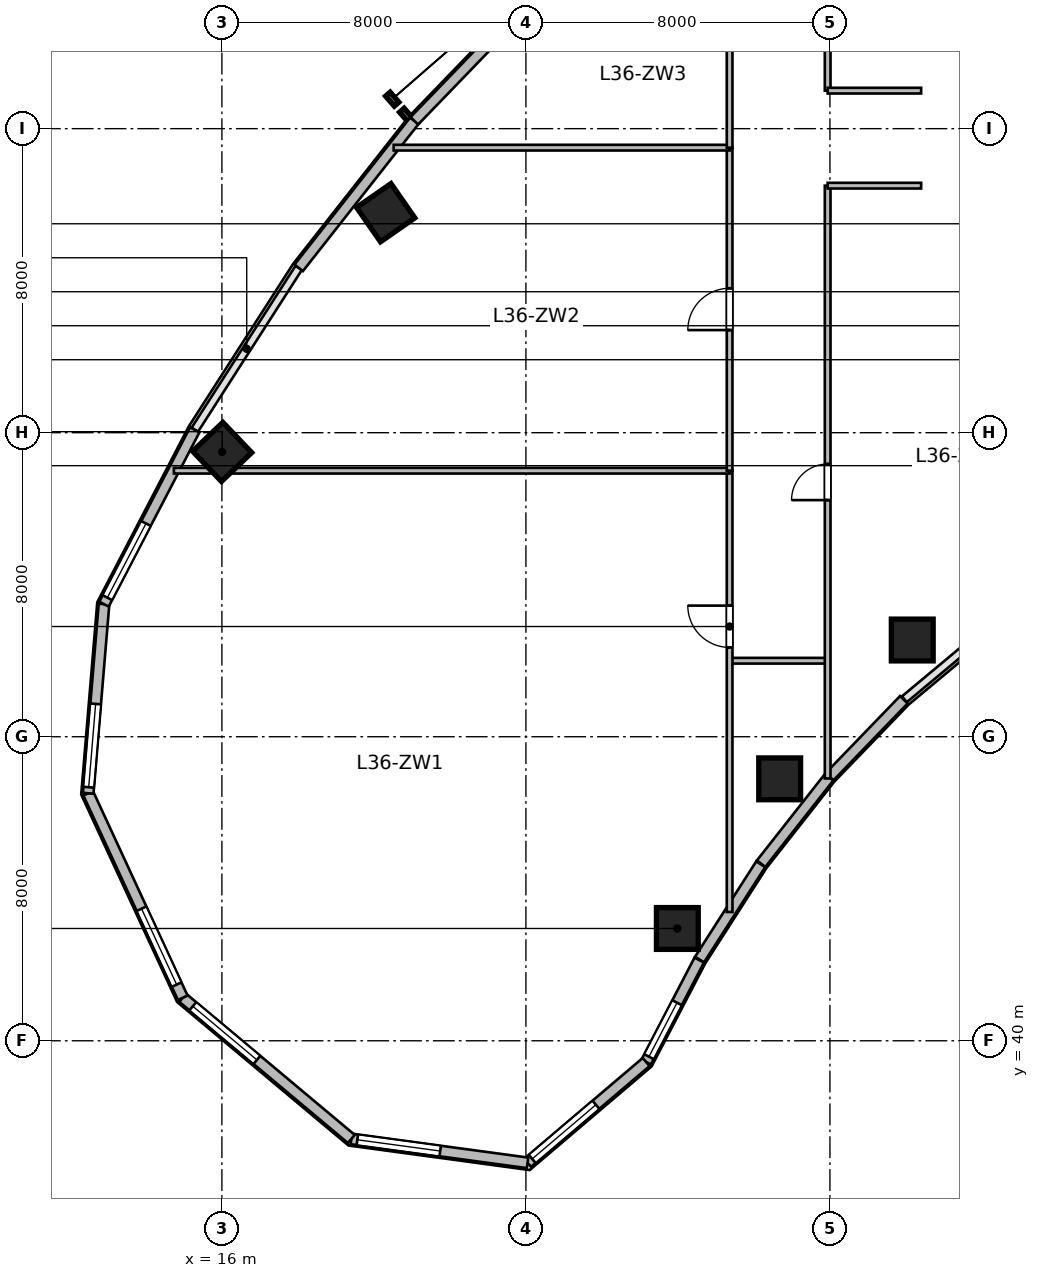
"""IFC4 building model, lengths in metres.
Left out: names, types, materials, properties, quantities, classifications, styles, units other than length and angle.
Written with IfcOpenShell. Run it as: python <this file> out.ifc"""

import sys

from ifc_helpers import new_model, si_unit, direction, frame, frame_2d, origin, origin_2d, place, context, subcontext, project, spatial, rectangle, circle, extrude, source, transform, mapped, element, fill, save


model = new_model("IFC4")
c1 = context("Model", 3, precision=1e-05, world=origin(), true_north=direction((0.0, 1.0)))
c2 = subcontext(c1, "Body", "Model", "MODEL_VIEW")
j1 = project(units=[si_unit("LENGTHUNIT", "METRE"), si_unit("PLANEANGLEUNIT", "RADIAN")], contexts=[c1])
p1 = place(None, origin())
s1 = spatial("IfcSite", under=j1, at=p1, CompositionType="ELEMENT")
p2 = place(p1, origin())
s2 = spatial("IfcBuilding", under=s1, at=p2, CompositionType="ELEMENT")
p3 = place(p2, frame((0.0, 0.0, 150.6)))
s3 = spatial("IfcBuildingStorey", under=s2, at=p3, CompositionType="ELEMENT", Elevation=150.6)
m1 = source(origin(), c2, "Body", "SweptSolid", [
    extrude(circle(Radius=0.55, at=origin_2d()), origin(), (0.0, 0.0, 1.0), 3.9),
])
p4 = place(p3, frame((27.985, 42.955, 0.0), z_axis=(0.0, 0.0, 1.0), x_axis=(-0.690756218984, 0.723087716626, 0.0)))
e1 = element("IfcColumn", 1, at=p4, inside=s3, PredefinedType="COLUMN", context=c2, shape_type="MappedRepresentation", body=[
    mapped(m1, transform((0.0, 0.0, 0.0), scale=1.0)),
])
m2 = source(origin(), c2, "Body", "SweptSolid", [
    extrude(rectangle(XDim=1.1, YDim=1.1, at=origin_2d()), origin(), (0.0, 0.0, 1.0), 3.9),
])
p5 = place(p3, frame((16.007, 55.494, 0.0), z_axis=(0.0, 0.0, 1.0), x_axis=(-0.690756218984, 0.723087716626, 0.0)))
e2 = element("IfcColumn", 2, at=p5, inside=s3, PredefinedType="COLUMN", context=c2, shape_type="MappedRepresentation", body=[
    mapped(m2, transform((0.0, 0.0, 0.0), scale=1.0)),
])
p6 = place(p3, frame((30.677, 46.892, 0.0), z_axis=(0.0, 0.0, 1.0), x_axis=(-0.571143442153, 0.820850271661, 0.0)))
e3 = element("IfcColumn", 3, at=p6, inside=s3, PredefinedType="COLUMN", context=c2, shape_type="MappedRepresentation", body=[
    mapped(m1, transform((0.0, 0.0, 0.0), scale=1.0)),
])
p7 = place(p3, frame((20.311, 61.789, 0.0), z_axis=(0.0, 0.0, 1.0), x_axis=(-0.571143442153, 0.820850271661, 0.0)))
e4 = element("IfcColumn", 4, at=p7, inside=s3, PredefinedType="COLUMN", context=c2, shape_type="MappedRepresentation", body=[
    mapped(m2, transform((0.0, 0.0, 0.0), scale=1.0)),
])
p8 = place(p3, frame((34.166, 50.545, 0.0), z_axis=(0.0, 0.0, 1.0), x_axis=(-0.436173672171, 0.899862504889, 0.0)))
e5 = element("IfcColumn", 5, at=p8, inside=s3, PredefinedType="COLUMN", context=c2, shape_type="MappedRepresentation", body=[
    mapped(m1, transform((0.0, 0.0, 0.0), scale=1.0)),
])
m3 = source(origin(), c2, "Body", "SweptSolid", [
    extrude(rectangle(XDim=2.812, YDim=0.28, at=frame_2d((1.406, 0.0))), origin(), (0.0, 0.0, 1.0), 3.65),
])
p9 = place(p3, frame((33.945, 48.973, 0.0), z_axis=(0.0, 0.0, 1.0), x_axis=(-0.694583668785, -0.719411931411, 0.0)))
e6 = element("IfcWall", 6, at=p9, inside=s3, PredefinedType="SOLIDWALL", context=c2, shape_type="MappedRepresentation", body=[
    mapped(m3, transform((0.0, 0.0, 0.0), scale=1.0)),
])
m4 = source(origin(), c2, "Body", "SweptSolid", [
    extrude(rectangle(XDim=2.897, YDim=0.28, at=frame_2d((1.448, 0.0))), origin(), (0.0, 0.0, 1.0), 3.65),
])
p10 = place(p3, frame((31.979, 46.936, 0.0), z_axis=(0.0, 0.0, 1.0), x_axis=(-0.618167636915, -0.786046291685, 0.0)))
e7 = element("IfcWall", 7, at=p10, inside=s3, PredefinedType="SOLIDWALL", context=c2, shape_type="MappedRepresentation", body=[
    mapped(m4, transform((0.0, 0.0, 0.0), scale=1.0)),
])
m5 = source(origin(), c2, "Body", "SweptSolid", [
    extrude(rectangle(XDim=2.981, YDim=0.28, at=frame_2d((1.49, 0.0))), origin(), (0.0, 0.0, 1.0), 3.65),
])
p11 = place(p3, frame((30.179, 44.645, 0.0), z_axis=(0.0, 0.0, 1.0), x_axis=(-0.540194451908, -0.841540227278, 0.0)))
e8 = element("IfcWall", 8, at=p11, inside=s3, PredefinedType="SOLIDWALL", context=c2, shape_type="MappedRepresentation", body=[
    mapped(m5, transform((0.0, 0.0, 0.0), scale=1.0)),
])
m6 = source(origin(), c2, "Body", "SweptSolid", [
    extrude(rectangle(XDim=3.024, YDim=0.28, at=frame_2d((1.512, 0.0))), origin(), (0.0, 0.0, 1.0), 3.65),
])
p12 = place(p3, frame((28.561, 42.123, 0.0), z_axis=(0.0, 0.0, 1.0), x_axis=(-0.461718746531, -0.887026380161, 0.0)))
e9 = element("IfcWall", 9, at=p12, inside=s3, PredefinedType="SOLIDWALL", context=c2, shape_type="MappedRepresentation", body=[
    mapped(m6, transform((0.0, 0.0, 0.0), scale=1.0)),
])
p13 = place(p12, frame((1.264, 0.0, 0.95)))
e10 = element("IfcOpeningElement", 10, at=p13, cuts=e9, PredefinedType="OPENING", context=c2, shape_type="SweptSolid", body=[
    extrude(rectangle(XDim=1.6, YDim=1.9, at=frame_2d((0.8, 0.95))), frame((0.0, 0.15, 0.0), z_axis=(0.0, -1.0, 0.0), x_axis=(1.0, 0.0, 0.0)), (0.0, 0.0, 1.0), 0.3),
])
m7 = source(origin(), c2, "Body", "SweptSolid", [
    extrude(rectangle(XDim=4.096, YDim=0.28, at=frame_2d((2.048, 0.0))), origin(), (0.0, 0.0, 1.0), 3.65),
])
p14 = place(p3, frame((27.164, 39.44, 0.0), z_axis=(0.0, 0.0, 1.0), x_axis=(-0.761926081737, -0.647663991564, 0.0)))
e11 = element("IfcWall", 11, at=p14, inside=s3, PredefinedType="SOLIDWALL", context=c2, shape_type="MappedRepresentation", body=[
    mapped(m7, transform((0.0, 0.0, 0.0), scale=1.0)),
])
p15 = place(p14, frame((1.736, 0.0, 0.95)))
e12 = element("IfcOpeningElement", 12, at=p15, cuts=e11, PredefinedType="OPENING", context=c2, shape_type="SweptSolid", body=[
    extrude(rectangle(XDim=2.2, YDim=2.1, at=frame_2d((1.1, 1.05))), frame((0.0, 0.15, 0.0), z_axis=(0.0, -1.0, 0.0), x_axis=(1.0, 0.0, 0.0)), (0.0, 0.0, 1.0), 0.3),
])
m8 = source(origin(), c2, "Body", "SweptSolid", [
    extrude(rectangle(XDim=4.68, YDim=0.28, at=frame_2d((2.34, 0.0))), origin(), (0.0, 0.0, 1.0), 3.65),
])
p16 = place(p3, frame((24.043, 36.788, 0.0), z_axis=(0.0, 0.0, 1.0), x_axis=(-0.990931146435, 0.134370618162, 0.0)))
e13 = element("IfcWall", 13, at=p16, inside=s3, PredefinedType="SOLIDWALL", context=c2, shape_type="MappedRepresentation", body=[
    mapped(m8, transform((0.0, 0.0, 0.0), scale=1.0)),
])
p17 = place(p16, frame((2.32, 0.0, 0.95)))
e14 = element("IfcOpeningElement", 14, at=p17, cuts=e13, PredefinedType="OPENING", context=c2, shape_type="SweptSolid", body=[
    extrude(rectangle(XDim=2.2, YDim=2.1, at=frame_2d((1.1, 1.05))), frame((0.0, 0.15, 0.0), z_axis=(0.0, -1.0, 0.0), x_axis=(1.0, 0.0, 0.0)), (0.0, 0.0, 1.0), 0.3),
])
m9 = source(origin(), c2, "Body", "SweptSolid", [
    extrude(rectangle(XDim=5.786, YDim=0.28, at=frame_2d((2.893, 0.0))), origin(), (0.0, 0.0, 1.0), 3.65),
])
p18 = place(p3, frame((19.406, 37.417, 0.0), z_axis=(0.0, 0.0, 1.0), x_axis=(-0.766711306852, 0.641992034176, 0.0)))
e15 = element("IfcWall", 15, at=p18, inside=s3, PredefinedType="SOLIDWALL", context=c2, shape_type="MappedRepresentation", body=[
    mapped(m9, transform((0.0, 0.0, 0.0), scale=1.0)),
])
p19 = place(p18, frame((3.24, 0.0, 0.95)))
e16 = element("IfcOpeningElement", 16, at=p19, cuts=e15, PredefinedType="OPENING", context=c2, shape_type="SweptSolid", body=[
    extrude(rectangle(XDim=2.2, YDim=2.1, at=frame_2d((1.1, 1.05))), frame((0.0, 0.15, 0.0), z_axis=(0.0, -1.0, 0.0), x_axis=(1.0, 0.0, 0.0)), (0.0, 0.0, 1.0), 0.3),
])
m10 = source(origin(), c2, "Body", "SweptSolid", [
    extrude(rectangle(XDim=5.927, YDim=0.28, at=frame_2d((2.964, 0.0))), origin(), (0.0, 0.0, 1.0), 3.65),
])
p20 = place(p3, frame((14.969, 41.131, 0.0), z_axis=(0.0, 0.0, 1.0), x_axis=(-0.419656204795, 0.907683132914, 0.0)))
e17 = element("IfcWall", 17, at=p20, inside=s3, PredefinedType="SOLIDWALL", context=c2, shape_type="MappedRepresentation", body=[
    mapped(m10, transform((0.0, 0.0, 0.0), scale=1.0)),
])
p21 = place(p20, frame((0.382, 0.0, 0.95)))
e18 = element("IfcOpeningElement", 18, at=p21, cuts=e17, PredefinedType="OPENING", context=c2, shape_type="SweptSolid", body=[
    extrude(rectangle(XDim=2.2, YDim=2.1, at=frame_2d((1.1, 1.05))), frame((0.0, 0.15, 0.0), z_axis=(0.0, -1.0, 0.0), x_axis=(1.0, 0.0, 0.0)), (0.0, 0.0, 1.0), 0.3),
])
m11 = source(origin(), c2, "Body", "SweptSolid", [
    extrude(rectangle(XDim=4.994, YDim=0.28, at=frame_2d((2.497, 0.0))), origin(), (0.0, 0.0, 1.0), 3.65),
])
p22 = place(p3, frame((12.481, 46.512, 0.0), z_axis=(0.0, 0.0, 1.0), x_axis=(0.083344839916, 0.996520766296, 0.0)))
e19 = element("IfcWall", 19, at=p22, inside=s3, PredefinedType="SOLIDWALL", context=c2, shape_type="MappedRepresentation", body=[
    mapped(m11, transform((0.0, 0.0, 0.0), scale=1.0)),
])
p23 = place(p22, frame((0.16, 0.0, 0.95)))
e20 = element("IfcOpeningElement", 20, at=p23, cuts=e19, PredefinedType="OPENING", context=c2, shape_type="SweptSolid", body=[
    extrude(rectangle(XDim=2.2, YDim=2.1, at=frame_2d((1.1, 1.05))), frame((0.0, 0.15, 0.0), z_axis=(0.0, -1.0, 0.0), x_axis=(1.0, 0.0, 0.0)), (0.0, 0.0, 1.0), 0.3),
])
m12 = source(origin(), c2, "Body", "SweptSolid", [
    extrude(rectangle(XDim=5.171, YDim=0.28, at=frame_2d((2.585, 0.0))), origin(), (0.0, 0.0, 1.0), 3.65),
])
p24 = place(p3, frame((12.898, 51.489, 0.0), z_axis=(0.0, 0.0, 1.0), x_axis=(0.461752581363, 0.887008767491, 0.0)))
e21 = element("IfcWall", 21, at=p24, inside=s3, PredefinedType="SOLIDWALL", context=c2, shape_type="MappedRepresentation", body=[
    mapped(m12, transform((0.0, 0.0, 0.0), scale=1.0)),
])
p25 = place(p24, frame((0.193, 0.0, 0.95)))
e22 = element("IfcOpeningElement", 22, at=p25, cuts=e21, PredefinedType="OPENING", context=c2, shape_type="SweptSolid", body=[
    extrude(rectangle(XDim=2.2, YDim=2.1, at=frame_2d((1.1, 1.05))), frame((0.0, 0.15, 0.0), z_axis=(0.0, -1.0, 0.0), x_axis=(1.0, 0.0, 0.0)), (0.0, 0.0, 1.0), 0.3),
])
m13 = source(origin(), c2, "Body", "SweptSolid", [
    extrude(rectangle(XDim=4.922, YDim=0.28, at=frame_2d((2.461, 0.0))), origin(), (0.0, 0.0, 1.0), 3.65),
])
p26 = place(p3, frame((18.021, 60.338, 0.0), z_axis=(0.0, 0.0, 1.0), x_axis=(0.61817639101, 0.786039407153, 0.0)))
e23 = element("IfcWall", 23, at=p26, inside=s3, PredefinedType="SOLIDWALL", context=c2, shape_type="MappedRepresentation", body=[
    mapped(m13, transform((0.0, 0.0, 0.0), scale=1.0)),
])
m14 = source(origin(), c2, "Body", "SweptSolid", [
    extrude(rectangle(XDim=4.776, YDim=0.28, at=frame_2d((2.388, 0.0))), origin(), (0.0, 0.0, 1.0), 3.65),
])
p27 = place(p3, frame((21.064, 64.206, 0.0), z_axis=(0.0, 0.0, 1.0), x_axis=(0.694601811851, 0.719394414055, 0.0)))
e24 = element("IfcWall", 24, at=p27, inside=s3, PredefinedType="SOLIDWALL", context=c2, shape_type="MappedRepresentation", body=[
    mapped(m14, transform((0.0, 0.0, 0.0), scale=1.0)),
])
m15 = source(origin(), c2, "Body", "SweptSolid", [
    extrude(rectangle(XDim=2.5, YDim=0.15, at=frame_2d((1.25, 0.0))), origin(), (0.0, 0.0, 1.0), 3.65),
])
p28 = place(p3, frame((29.4, 50.0, 0.0), z_axis=(0.0, 0.0, 1.0), x_axis=(1.0, 0.0, 0.0)))
e25 = element("IfcWall", 25, at=p28, inside=s3, PredefinedType="PARTITIONING", context=c2, shape_type="MappedRepresentation", body=[
    mapped(m15, transform((0.0, 0.0, 0.0), scale=1.0)),
])
m16 = source(origin(), c2, "Body", "SweptSolid", [
    extrude(rectangle(XDim=11.612, YDim=0.15, at=frame_2d((5.806, 0.0))), origin(), (0.0, 0.0, 1.0), 2.942),
])
p29 = place(p3, frame((29.36, 43.388, 0.0), z_axis=(0.0, 0.0, 1.0), x_axis=(0.0, 1.0, 0.0)))
e26 = element("IfcWall", 26, at=p29, inside=s3, PredefinedType="PARTITIONING", context=c2, shape_type="MappedRepresentation", body=[
    mapped(m16, transform((0.0, 0.0, 0.0), scale=1.0)),
])
p30 = place(p29, frame((6.962, 0.0, 0.0)))
e27 = element("IfcOpeningElement", 27, at=p30, cuts=e26, PredefinedType="OPENING", context=c2, shape_type="SweptSolid", body=[
    extrude(rectangle(XDim=1.1, YDim=2.15, at=frame_2d((0.55, 1.075))), frame((0.0, 0.085, 0.0), z_axis=(0.0, -1.0, 0.0), x_axis=(1.0, 0.0, 0.0)), (0.0, 0.0, 1.0), 0.17),
])
m17 = source(origin(), c2, "Body", "SweptSolid", [
    extrude(rectangle(XDim=14.623, YDim=0.15, at=frame_2d((7.312, 0.0))), origin(), (0.0, 0.0, 1.0), 3.65),
])
p31 = place(p3, frame((14.737, 55.0, 0.0), z_axis=(0.0, 0.0, 1.0), x_axis=(1.0, 0.0, 0.0)))
e28 = element("IfcWall", 28, at=p31, inside=s3, PredefinedType="PARTITIONING", context=c2, shape_type="MappedRepresentation", body=[
    mapped(m17, transform((0.0, 0.0, 0.0), scale=1.0)),
])
m18 = source(origin(), c2, "Body", "SweptSolid", [
    extrude(rectangle(XDim=8.5, YDim=0.15, at=frame_2d((4.25, 0.0))), origin(), (0.0, 0.0, 1.0), 2.942),
])
p32 = place(p3, frame((29.36, 55.0, 0.0), z_axis=(0.0, 0.0, 1.0), x_axis=(0.0, 1.0, 0.0)))
e29 = element("IfcWall", 29, at=p32, inside=s3, PredefinedType="PARTITIONING", context=c2, shape_type="MappedRepresentation", body=[
    mapped(m18, transform((0.0, 0.0, 0.0), scale=1.0)),
])
p33 = place(p32, frame((3.7, 0.0, 0.0)))
e30 = element("IfcOpeningElement", 30, at=p33, cuts=e29, PredefinedType="OPENING", context=c2, shape_type="SweptSolid", body=[
    extrude(rectangle(XDim=1.1, YDim=2.15, at=frame_2d((0.55, 1.075))), frame((0.0, 0.085, 0.0), z_axis=(0.0, -1.0, 0.0), x_axis=(1.0, 0.0, 0.0)), (0.0, 0.0, 1.0), 0.17),
])
m19 = source(origin(), c2, "Body", "SweptSolid", [
    extrude(rectangle(XDim=8.839, YDim=0.15, at=frame_2d((4.419, 0.0))), origin(), (0.0, 0.0, 1.0), 3.65),
])
p34 = place(p3, frame((20.521, 63.5, 0.0), z_axis=(0.0, 0.0, 1.0), x_axis=(1.0, 0.0, 0.0)))
e31 = element("IfcWall", 31, at=p34, inside=s3, PredefinedType="PARTITIONING", context=c2, shape_type="MappedRepresentation", body=[
    mapped(m19, transform((0.0, 0.0, 0.0), scale=1.0)),
])
m20 = source(origin(), c2, "Body", "SweptSolid", [
    extrude(rectangle(XDim=8.031, YDim=0.15, at=frame_2d((4.015, 0.0))), origin(), (0.0, 0.0, 1.0), 3.65),
])
p35 = place(p3, frame((29.36, 63.5, 0.0), z_axis=(0.0, 0.0, 1.0), x_axis=(0.0, 1.0, 0.0)))
e32 = element("IfcWall", 32, at=p35, inside=s3, PredefinedType="PARTITIONING", context=c2, shape_type="MappedRepresentation", body=[
    mapped(m20, transform((0.0, 0.0, 0.0), scale=1.0)),
])
p36 = place(p35, frame((3.465, 0.0, 0.0)))
e33 = element("IfcOpeningElement", 33, at=p36, cuts=e32, PredefinedType="OPENING", context=c2, shape_type="SweptSolid", body=[
    extrude(rectangle(XDim=1.1, YDim=2.15, at=frame_2d((0.55, 1.075))), frame((0.0, 0.085, 0.0), z_axis=(0.0, -1.0, 0.0), x_axis=(1.0, 0.0, 0.0)), (0.0, 0.0, 1.0), 0.17),
])
m21 = source(origin(), c2, "Body", "SweptSolid", [
    extrude(rectangle(XDim=15.598, YDim=0.15, at=frame_2d((7.799, 0.0))), origin(), (0.0, 0.0, 1.0), 2.942),
])
p37 = place(p3, frame((31.94, 46.902, 0.0), z_axis=(0.0, 0.0, 1.0), x_axis=(0.0, 1.0, 0.0)))
e34 = element("IfcWall", 34, at=p37, inside=s3, PredefinedType="PARTITIONING", context=c2, shape_type="MappedRepresentation", body=[
    mapped(m21, transform((0.0, 0.0, 0.0), scale=1.0)),
])
p38 = place(p37, frame((7.324, 0.0, 0.0)))
e35 = element("IfcOpeningElement", 35, at=p38, cuts=e34, PredefinedType="OPENING", context=c2, shape_type="SweptSolid", body=[
    extrude(rectangle(XDim=0.95, YDim=2.1, at=frame_2d((0.475, 1.05))), frame((0.0, 0.085, 0.0), z_axis=(0.0, -1.0, 0.0), x_axis=(1.0, 0.0, 0.0)), (0.0, 0.0, 1.0), 0.17),
])
m22 = source(origin(), c2, "Body", "SweptSolid", [
    extrude(rectangle(XDim=2.46, YDim=0.15, at=frame_2d((1.23, 0.0))), origin(), (0.0, 0.0, 1.0), 3.65),
])
p39 = place(p3, frame((31.94, 62.5, 0.0), z_axis=(0.0, 0.0, 1.0), x_axis=(1.0, 0.0, 0.0)))
e36 = element("IfcWall", 36, at=p39, inside=s3, PredefinedType="PARTITIONING", context=c2, shape_type="MappedRepresentation", body=[
    mapped(m22, transform((0.0, 0.0, 0.0), scale=1.0)),
])
m23 = source(origin(), c2, "Body", "SweptSolid", [
    extrude(rectangle(XDim=8.187, YDim=0.15, at=frame_2d((4.093, 0.0))), origin(), (0.0, 0.0, 1.0), 3.65),
])
p40 = place(p3, frame((31.94, 65.0, 0.0), z_axis=(0.0, 0.0, 1.0), x_axis=(0.0, 1.0, 0.0)))
e37 = element("IfcWall", 37, at=p40, inside=s3, PredefinedType="PARTITIONING", context=c2, shape_type="MappedRepresentation", body=[
    mapped(m23, transform((0.0, 0.0, 0.0), scale=1.0)),
])
p41 = place(p40, frame((3.618, 0.0, 0.0)))
e38 = element("IfcOpeningElement", 38, at=p41, cuts=e37, PredefinedType="OPENING", context=c2, shape_type="SweptSolid", body=[
    extrude(rectangle(XDim=0.95, YDim=2.1, at=frame_2d((0.475, 1.05))), frame((0.0, 0.085, 0.0), z_axis=(0.0, -1.0, 0.0), x_axis=(1.0, 0.0, 0.0)), (0.0, 0.0, 1.0), 0.17),
])
p42 = place(p3, frame((31.94, 65.0, 0.0), z_axis=(0.0, 0.0, 1.0), x_axis=(1.0, 0.0, 0.0)))
e39 = element("IfcWall", 39, at=p42, inside=s3, PredefinedType="PARTITIONING", context=c2, shape_type="MappedRepresentation", body=[
    mapped(m22, transform((0.0, 0.0, 0.0), scale=1.0)),
])
m24 = source(origin(), c2, "Body", "SweptSolid", [
    extrude(rectangle(XDim=1.6, YDim=1.9, at=frame_2d((0.8, 0.95))), frame((0.0, 0.03, 0.0), z_axis=(0.0, -1.0, 0.0), x_axis=(1.0, 0.0, 0.0)), (0.0, 0.0, 1.0), 0.06),
])
p43 = place(p13, origin())
e40 = element("IfcWindow", 40, at=p43, inside=s3, PartitioningType="SINGLE_PANEL", PredefinedType="WINDOW", context=c2, shape_type="MappedRepresentation", body=[
    mapped(m24, transform((0.0, 0.0, 0.0), scale=1.0)),
])
fill(e10, e40)
m25 = source(origin(), c2, "Body", "SweptSolid", [
    extrude(rectangle(XDim=2.2, YDim=2.1, at=frame_2d((1.1, 1.05))), frame((0.0, 0.03, 0.0), z_axis=(0.0, -1.0, 0.0), x_axis=(1.0, 0.0, 0.0)), (0.0, 0.0, 1.0), 0.06),
])
p44 = place(p15, origin())
e41 = element("IfcWindow", 41, at=p44, inside=s3, PartitioningType="TRIPLE_PANEL_VERTICAL", PredefinedType="WINDOW", context=c2, shape_type="MappedRepresentation", body=[
    mapped(m25, transform((0.0, 0.0, 0.0), scale=1.0)),
])
fill(e12, e41)
p45 = place(p17, origin())
e42 = element("IfcWindow", 42, at=p45, inside=s3, PartitioningType="TRIPLE_PANEL_VERTICAL", PredefinedType="WINDOW", context=c2, shape_type="MappedRepresentation", body=[
    mapped(m25, transform((0.0, 0.0, 0.0), scale=1.0)),
])
fill(e14, e42)
p46 = place(p19, origin())
e43 = element("IfcWindow", 43, at=p46, inside=s3, PartitioningType="TRIPLE_PANEL_VERTICAL", PredefinedType="WINDOW", context=c2, shape_type="MappedRepresentation", body=[
    mapped(m25, transform((0.0, 0.0, 0.0), scale=1.0)),
])
fill(e16, e43)
p47 = place(p21, origin())
e44 = element("IfcWindow", 44, at=p47, inside=s3, PartitioningType="TRIPLE_PANEL_VERTICAL", PredefinedType="WINDOW", context=c2, shape_type="MappedRepresentation", body=[
    mapped(m25, transform((0.0, 0.0, 0.0), scale=1.0)),
])
fill(e18, e44)
p48 = place(p23, origin())
e45 = element("IfcWindow", 45, at=p48, inside=s3, PartitioningType="TRIPLE_PANEL_VERTICAL", PredefinedType="WINDOW", context=c2, shape_type="MappedRepresentation", body=[
    mapped(m25, transform((0.0, 0.0, 0.0), scale=1.0)),
])
fill(e20, e45)
p49 = place(p25, origin())
e46 = element("IfcWindow", 46, at=p49, inside=s3, PartitioningType="TRIPLE_PANEL_VERTICAL", PredefinedType="WINDOW", context=c2, shape_type="MappedRepresentation", body=[
    mapped(m25, transform((0.0, 0.0, 0.0), scale=1.0)),
])
fill(e22, e46)
m26 = source(origin(), c2, "Body", "SweptSolid", [
    extrude(rectangle(XDim=1.1, YDim=2.15, at=frame_2d((0.55, 1.075))), frame((0.0, 0.025, 0.0), z_axis=(0.0, -1.0, 0.0), x_axis=(1.0, 0.0, 0.0)), (0.0, 0.0, 1.0), 0.05),
])
p50 = place(p30, origin())
e47 = element("IfcDoor", 47, at=p50, inside=s3, OperationType="SINGLE_SWING_RIGHT", PredefinedType="DOOR", context=c2, shape_type="MappedRepresentation", body=[
    mapped(m26, transform((0.0, 0.0, 0.0), scale=1.0)),
])
fill(e27, e47)
p51 = place(p33, origin())
e48 = element("IfcDoor", 48, at=p51, inside=s3, OperationType="SINGLE_SWING_LEFT", PredefinedType="DOOR", context=c2, shape_type="MappedRepresentation", body=[
    mapped(m26, transform((0.0, 0.0, 0.0), scale=1.0)),
])
fill(e30, e48)
m27 = source(origin(), c2, "Body", "SweptSolid", [
    extrude(rectangle(XDim=0.95, YDim=2.1, at=frame_2d((0.475, 1.05))), frame((0.0, 0.025, 0.0), z_axis=(0.0, -1.0, 0.0), x_axis=(1.0, 0.0, 0.0)), (0.0, 0.0, 1.0), 0.05),
])
p52 = place(p38, origin())
e49 = element("IfcDoor", 49, at=p52, inside=s3, OperationType="SINGLE_SWING_LEFT", PredefinedType="DOOR", context=c2, shape_type="MappedRepresentation", body=[
    mapped(m27, transform((0.0, 0.0, 0.0), scale=1.0)),
])
fill(e35, e49)
save(model, sys.argv[1])
